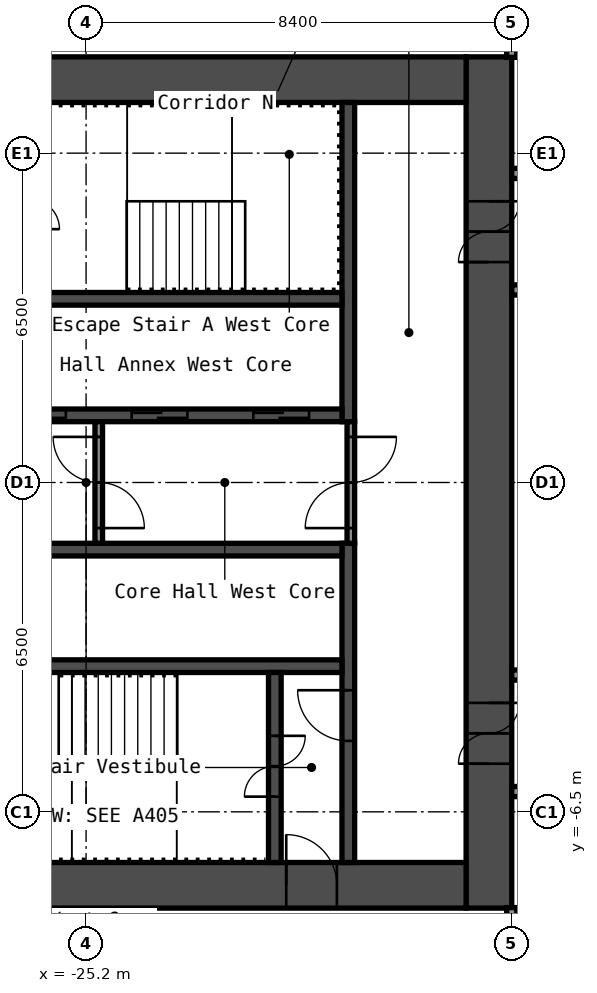
"""IFC4 building model, lengths in metres.
Left out: names, types, materials, properties, quantities, classifications, styles, units other than length and angle.
Written with IfcOpenShell. Run it as: python <this file> out.ifc"""

import sys

from ifc_helpers import new_model, si_unit, direction, frame, frame_2d, origin, place, context, subcontext, project, spatial, rectangle, extrude, element, fill, save


model = new_model("IFC4")
c1 = context("Model", 3, precision=1e-05, world=origin(), true_north=direction((0.0, 1.0)))
c2 = subcontext(c1, "Body", "Model", "MODEL_VIEW")
j1 = project(units=[si_unit("LENGTHUNIT", "METRE"), si_unit("PLANEANGLEUNIT", "RADIAN")], contexts=[c1])
p1 = place(None, origin())
s1 = spatial("IfcSite", under=j1, at=p1, CompositionType="ELEMENT")
p2 = place(p1, origin())
s2 = spatial("IfcBuilding", under=s1, at=p2, CompositionType="ELEMENT")
p3 = place(p2, frame((0.0, 0.0, 32.6)))
s3 = spatial("IfcBuildingStorey", under=s2, at=p3, CompositionType="ELEMENT", Elevation=32.6)
p4 = place(p3, frame((-17.25, -8.4, 0.0), z_axis=(0.0, 0.0, 1.0), x_axis=(0.0, 1.0, 0.0)))
e1 = element("IfcWall", 1, at=p4, inside=s3, PredefinedType="SHEAR", context=c2, shape_type="SweptSolid", body=[
    extrude(rectangle(XDim=16.8, YDim=0.9, at=frame_2d((8.4, 0.0))), origin(), (0.0, 0.0, 1.0), 2.8),
])
p5 = place(p4, frame((12.75, 0.0, 0.0)))
e2 = element("IfcOpeningElement", 2, at=p5, cuts=e1, PredefinedType="OPENING", context=c2, shape_type="SweptSolid", body=[
    extrude(rectangle(XDim=1.2, YDim=2.1, at=frame_2d((0.6, 1.05))), frame((0.0, 0.46, 0.0), z_axis=(0.0, -1.0, 0.0), x_axis=(1.0, 0.0, 0.0)), (0.0, 0.0, 1.0), 0.92),
])
p6 = place(p4, frame((2.85, 0.0, 0.0)))
e3 = element("IfcOpeningElement", 3, at=p6, cuts=e1, PredefinedType="OPENING", context=c2, shape_type="SweptSolid", body=[
    extrude(rectangle(XDim=1.2, YDim=2.1, at=frame_2d((0.6, 1.05))), frame((0.0, 0.46, 0.0), z_axis=(0.0, -1.0, 0.0), x_axis=(1.0, 0.0, 0.0)), (0.0, 0.0, 1.0), 0.92),
])
p7 = place(p3, frame((-32.7, 7.95, 0.0), z_axis=(0.0, 0.0, 1.0), x_axis=(1.0, 0.0, 0.0)))
e4 = element("IfcWall", 4, at=p7, inside=s3, PredefinedType="SHEAR", context=c2, shape_type="SweptSolid", body=[
    extrude(rectangle(XDim=15.0, YDim=0.9, at=frame_2d((7.5, 0.0))), origin(), (0.0, 0.0, 1.0), 2.8),
])
p8 = place(p7, frame((3.4, 0.0, 0.0)))
e5 = element("IfcOpeningElement", 5, at=p8, cuts=e4, PredefinedType="OPENING", context=c2, shape_type="SweptSolid", body=[
    extrude(rectangle(XDim=1.2, YDim=2.1, at=frame_2d((0.6, 1.05))), frame((0.0, 0.46, 0.0), z_axis=(0.0, -1.0, 0.0), x_axis=(1.0, 0.0, 0.0)), (0.0, 0.0, 1.0), 0.92),
])
p9 = place(p7, frame((0.75, 0.0, 0.0)))
e6 = element("IfcOpeningElement", 6, at=p9, cuts=e4, PredefinedType="OPENING", context=c2, shape_type="SweptSolid", body=[
    extrude(rectangle(XDim=0.9, YDim=2.1, at=frame_2d((0.45, 1.05))), frame((0.0, 0.46, 0.0), z_axis=(0.0, -1.0, 0.0), x_axis=(1.0, 0.0, 0.0)), (0.0, 0.0, 1.0), 0.92),
])
p10 = place(p3, frame((-32.7, -7.95, 0.0), z_axis=(0.0, 0.0, 1.0), x_axis=(1.0, 0.0, 0.0)))
e7 = element("IfcWall", 7, at=p10, inside=s3, PredefinedType="SHEAR", context=c2, shape_type="SweptSolid", body=[
    extrude(rectangle(XDim=15.0, YDim=0.9, at=frame_2d((7.5, 0.0))), origin(), (0.0, 0.0, 1.0), 2.8),
])
p11 = place(p10, frame((11.45, 0.0, 0.0)))
e8 = element("IfcOpeningElement", 8, at=p11, cuts=e7, PredefinedType="OPENING", context=c2, shape_type="SweptSolid", body=[
    extrude(rectangle(XDim=1.0, YDim=2.1, at=frame_2d((0.5, 1.05))), frame((0.0, 0.46, 0.0), z_axis=(0.0, -1.0, 0.0), x_axis=(1.0, 0.0, 0.0)), (0.0, 0.0, 1.0), 0.92),
])
p12 = place(p3, frame((-20.025, 1.2, 0.0), z_axis=(0.0, 0.0, 1.0), x_axis=(0.0, 1.0, 0.0)))
e9 = element("IfcWall", 9, at=p12, inside=s3, PredefinedType="SHEAR", context=c2, shape_type="SweptSolid", body=[
    extrude(rectangle(XDim=6.3, YDim=0.25, at=frame_2d((3.15, 0.0))), origin(), (0.0, 0.0, 1.0), 2.8),
])
p13 = place(p3, frame((-20.025, -7.5, 0.0), z_axis=(0.0, 0.0, 1.0), x_axis=(0.0, 1.0, 0.0)))
e10 = element("IfcWall", 10, at=p13, inside=s3, PredefinedType="SHEAR", context=c2, shape_type="SweptSolid", body=[
    extrude(rectangle(XDim=6.3, YDim=0.25, at=frame_2d((3.15, 0.0))), origin(), (0.0, 0.0, 1.0), 2.8),
])
p14 = place(p13, frame((2.4, 0.0, 0.0)))
e11 = element("IfcOpeningElement", 11, at=p14, cuts=e10, PredefinedType="OPENING", context=c2, shape_type="SweptSolid", body=[
    extrude(rectangle(XDim=1.0, YDim=2.1, at=frame_2d((0.5, 1.05))), frame((0.0, 0.135, 0.0), z_axis=(0.0, -1.0, 0.0), x_axis=(1.0, 0.0, 0.0)), (0.0, 0.0, 1.0), 0.27),
])
p15 = place(p3, frame((-27.65, 1.325, 0.0), z_axis=(0.0, 0.0, 1.0), x_axis=(1.0, 0.0, 0.0)))
e12 = element("IfcWall", 12, at=p15, inside=s3, PredefinedType="SHEAR", context=c2, shape_type="SweptSolid", body=[
    extrude(rectangle(XDim=7.5, YDim=0.25, at=frame_2d((3.75, 0.0))), origin(), (0.0, 0.0, 1.0), 2.8),
])
p16 = place(p15, frame((5.75, 0.0, 0.0)))
e13 = element("IfcOpeningElement", 13, at=p16, cuts=e12, PredefinedType="OPENING", context=c2, shape_type="SweptSolid", body=[
    extrude(rectangle(XDim=1.1, YDim=2.1, at=frame_2d((0.55, 1.05))), frame((0.0, 0.135, 0.0), z_axis=(0.0, -1.0, 0.0), x_axis=(1.0, 0.0, 0.0)), (0.0, 0.0, 1.0), 0.27),
])
p17 = place(p15, frame((3.35, 0.0, 0.0)))
e14 = element("IfcOpeningElement", 14, at=p17, cuts=e12, PredefinedType="OPENING", context=c2, shape_type="SweptSolid", body=[
    extrude(rectangle(XDim=1.1, YDim=2.1, at=frame_2d((0.55, 1.05))), frame((0.0, 0.135, 0.0), z_axis=(0.0, -1.0, 0.0), x_axis=(1.0, 0.0, 0.0)), (0.0, 0.0, 1.0), 0.27),
])
p18 = place(p15, frame((0.95, 0.0, 0.0)))
e15 = element("IfcOpeningElement", 15, at=p18, cuts=e12, PredefinedType="OPENING", context=c2, shape_type="SweptSolid", body=[
    extrude(rectangle(XDim=1.1, YDim=2.1, at=frame_2d((0.55, 1.05))), frame((0.0, 0.135, 0.0), z_axis=(0.0, -1.0, 0.0), x_axis=(1.0, 0.0, 0.0)), (0.0, 0.0, 1.0), 0.27),
])
for number, where, z_axis, x_axis in (
    (16, (-27.65, 3.625, 0.0), (0.0, 0.0, 1.0), (1.0, 0.0, 0.0)),
    (17, (-27.65, -1.325, 0.0), (0.0, 0.0, 1.0), (1.0, 0.0, 0.0)),
    (18, (-27.65, -3.625, 0.0), (0.0, 0.0, 1.0), (1.0, 0.0, 0.0)),
):
    element("IfcWall", number, at=place(p3, frame(where, z_axis=z_axis, x_axis=x_axis)), inside=s3, PredefinedType="SHEAR", context=c2, shape_type="SweptSolid", body=[
        extrude(rectangle(XDim=7.5, YDim=0.25, at=frame_2d((3.75, 0.0))), origin(), (0.0, 0.0, 1.0), 2.8),
    ])
p19 = place(p3, frame((-21.475, -7.5, 0.0), z_axis=(0.0, 0.0, 1.0), x_axis=(0.0, 1.0, 0.0)))
e19 = element("IfcWall", 19, at=p19, inside=s3, PredefinedType="SHEAR", context=c2, shape_type="SweptSolid", body=[
    extrude(rectangle(XDim=3.75, YDim=0.25, at=frame_2d((1.875, 0.0))), origin(), (0.0, 0.0, 1.0), 2.8),
])
p20 = place(p19, frame((1.3, 0.0, 0.0)))
e20 = element("IfcOpeningElement", 20, at=p20, cuts=e19, PredefinedType="OPENING", context=c2, shape_type="SweptSolid", body=[
    extrude(rectangle(XDim=1.2, YDim=2.1, at=frame_2d((0.6, 1.05))), frame((0.0, 0.135, 0.0), z_axis=(0.0, -1.0, 0.0), x_axis=(1.0, 0.0, 0.0)), (0.0, 0.0, 1.0), 0.27),
])
p21 = place(p3, frame((-19.975, -1.2, 0.0), z_axis=(0.0, 0.0, 1.0), x_axis=(0.0, 1.0, 0.0)))
e21 = element("IfcWall", 21, at=p21, inside=s3, PredefinedType="PARTITIONING", context=c2, shape_type="SweptSolid", body=[
    extrude(rectangle(XDim=2.4, YDim=0.15, at=frame_2d((1.2, 0.0))), origin(), (0.0, 0.0, 1.0), 2.8),
])
p22 = place(p21, frame((0.3, 0.0, 0.0)))
e22 = element("IfcOpeningElement", 22, at=p22, cuts=e21, PredefinedType="OPENING", context=c2, shape_type="SweptSolid", body=[
    extrude(rectangle(XDim=1.8, YDim=2.1, at=frame_2d((0.9, 1.05))), frame((0.0, 0.085, 0.0), z_axis=(0.0, -1.0, 0.0), x_axis=(1.0, 0.0, 0.0)), (0.0, 0.0, 1.0), 0.17),
])
p23 = place(p3, frame((-24.95, -1.2, 0.0), z_axis=(0.0, 0.0, 1.0), x_axis=(0.0, 1.0, 0.0)))
e23 = element("IfcWall", 23, at=p23, inside=s3, PredefinedType="PARTITIONING", context=c2, shape_type="SweptSolid", body=[
    extrude(rectangle(XDim=2.4, YDim=0.15, at=frame_2d((1.2, 0.0))), origin(), (0.0, 0.0, 1.0), 2.8),
])
p24 = place(p23, frame((0.3, 0.0, 0.0)))
e24 = element("IfcOpeningElement", 24, at=p24, cuts=e23, PredefinedType="OPENING", context=c2, shape_type="SweptSolid", body=[
    extrude(rectangle(XDim=1.8, YDim=2.1, at=frame_2d((0.9, 1.05))), frame((0.0, 0.085, 0.0), z_axis=(0.0, -1.0, 0.0), x_axis=(1.0, 0.0, 0.0)), (0.0, 0.0, 1.0), 0.17),
])
p25 = place(p3, frame((-16.8, -6.1, 0.0), z_axis=(0.0, 0.0, 1.0), x_axis=(1.0, 0.0, 0.0)))
e25 = element("IfcWall", 25, at=p25, inside=s3, PredefinedType="PARTITIONING", context=c2, shape_type="SweptSolid", body=[
    extrude(rectangle(XDim=33.6, YDim=0.2, at=frame_2d((16.8, 0.0))), origin(), (0.0, 0.0, 1.0), 2.8),
])
p26 = place(p25, frame((1.6, 0.0, 0.0)))
e26 = element("IfcOpeningElement", 26, at=p26, cuts=e25, PredefinedType="OPENING", context=c2, shape_type="SweptSolid", body=[
    extrude(rectangle(XDim=1.0, YDim=2.1, at=frame_2d((0.5, 1.05))), frame((0.0, 0.11, 0.0), z_axis=(0.0, -1.0, 0.0), x_axis=(1.0, 0.0, 0.0)), (0.0, 0.0, 1.0), 0.22),
])
p27 = place(p25, frame((10.0, 0.0, 0.0)))
e27 = element("IfcOpeningElement", 27, at=p27, cuts=e25, PredefinedType="OPENING", context=c2, shape_type="SweptSolid", body=[
    extrude(rectangle(XDim=1.0, YDim=2.1, at=frame_2d((0.5, 1.05))), frame((0.0, 0.11, 0.0), z_axis=(0.0, -1.0, 0.0), x_axis=(1.0, 0.0, 0.0)), (0.0, 0.0, 1.0), 0.22),
])
p28 = place(p25, frame((22.6, 0.0, 0.0)))
e28 = element("IfcOpeningElement", 28, at=p28, cuts=e25, PredefinedType="OPENING", context=c2, shape_type="SweptSolid", body=[
    extrude(rectangle(XDim=1.0, YDim=2.1, at=frame_2d((0.5, 1.05))), frame((0.0, 0.11, 0.0), z_axis=(0.0, -1.0, 0.0), x_axis=(1.0, 0.0, 0.0)), (0.0, 0.0, 1.0), 0.22),
])
p29 = place(p25, frame((27.1, 0.0, 0.0)))
e29 = element("IfcOpeningElement", 29, at=p29, cuts=e25, PredefinedType="OPENING", context=c2, shape_type="SweptSolid", body=[
    extrude(rectangle(XDim=1.0, YDim=2.1, at=frame_2d((0.5, 1.05))), frame((0.0, 0.11, 0.0), z_axis=(0.0, -1.0, 0.0), x_axis=(1.0, 0.0, 0.0)), (0.0, 0.0, 1.0), 0.22),
])
p30 = place(p3, frame((-16.8, -3.8, 0.0), z_axis=(0.0, 0.0, 1.0), x_axis=(1.0, 0.0, 0.0)))
e30 = element("IfcWall", 30, at=p30, inside=s3, PredefinedType="PARTITIONING", context=c2, shape_type="SweptSolid", body=[
    extrude(rectangle(XDim=33.6, YDim=0.2, at=frame_2d((16.8, 0.0))), origin(), (0.0, 0.0, 1.0), 2.8),
])
p31 = place(p30, frame((10.3, 0.0, 0.0)))
e31 = element("IfcOpeningElement", 31, at=p31, cuts=e30, PredefinedType="OPENING", context=c2, shape_type="SweptSolid", body=[
    extrude(rectangle(XDim=0.9, YDim=2.1, at=frame_2d((0.45, 1.05))), frame((0.0, 0.11, 0.0), z_axis=(0.0, -1.0, 0.0), x_axis=(1.0, 0.0, 0.0)), (0.0, 0.0, 1.0), 0.22),
])
p32 = place(p30, frame((14.5, 0.0, 0.0)))
e32 = element("IfcOpeningElement", 32, at=p32, cuts=e30, PredefinedType="OPENING", context=c2, shape_type="SweptSolid", body=[
    extrude(rectangle(XDim=0.9, YDim=2.1, at=frame_2d((0.45, 1.05))), frame((0.0, 0.11, 0.0), z_axis=(0.0, -1.0, 0.0), x_axis=(1.0, 0.0, 0.0)), (0.0, 0.0, 1.0), 0.22),
])
p33 = place(p30, frame((27.02, 0.0, 0.0)))
e33 = element("IfcOpeningElement", 33, at=p33, cuts=e30, PredefinedType="OPENING", context=c2, shape_type="SweptSolid", body=[
    extrude(rectangle(XDim=0.9, YDim=2.1, at=frame_2d((0.45, 1.05))), frame((0.0, 0.11, 0.0), z_axis=(0.0, -1.0, 0.0), x_axis=(1.0, 0.0, 0.0)), (0.0, 0.0, 1.0), 0.22),
])
p34 = place(p30, frame((31.22, 0.0, 0.0)))
e34 = element("IfcOpeningElement", 34, at=p34, cuts=e30, PredefinedType="OPENING", context=c2, shape_type="SweptSolid", body=[
    extrude(rectangle(XDim=0.9, YDim=2.1, at=frame_2d((0.45, 1.05))), frame((0.0, 0.11, 0.0), z_axis=(0.0, -1.0, 0.0), x_axis=(1.0, 0.0, 0.0)), (0.0, 0.0, 1.0), 0.22),
])
p35 = place(p3, frame((-16.8, 3.8, 0.0), z_axis=(0.0, 0.0, 1.0), x_axis=(1.0, 0.0, 0.0)))
e35 = element("IfcWall", 35, at=p35, inside=s3, PredefinedType="PARTITIONING", context=c2, shape_type="SweptSolid", body=[
    extrude(rectangle(XDim=33.6, YDim=0.2, at=frame_2d((16.8, 0.0))), origin(), (0.0, 0.0, 1.0), 2.8),
])
p36 = place(p35, frame((1.4, 0.0, 0.0)))
e36 = element("IfcOpeningElement", 36, at=p36, cuts=e35, PredefinedType="OPENING", context=c2, shape_type="SweptSolid", body=[
    extrude(rectangle(XDim=0.9, YDim=2.1, at=frame_2d((0.45, 1.05))), frame((0.0, 0.11, 0.0), z_axis=(0.0, -1.0, 0.0), x_axis=(1.0, 0.0, 0.0)), (0.0, 0.0, 1.0), 0.22),
])
p37 = place(p35, frame((5.6, 0.0, 0.0)))
e37 = element("IfcOpeningElement", 37, at=p37, cuts=e35, PredefinedType="OPENING", context=c2, shape_type="SweptSolid", body=[
    extrude(rectangle(XDim=0.9, YDim=2.1, at=frame_2d((0.45, 1.05))), frame((0.0, 0.11, 0.0), z_axis=(0.0, -1.0, 0.0), x_axis=(1.0, 0.0, 0.0)), (0.0, 0.0, 1.0), 0.22),
])
p38 = place(p35, frame((18.87, 0.0, 0.0)))
e38 = element("IfcOpeningElement", 38, at=p38, cuts=e35, PredefinedType="OPENING", context=c2, shape_type="SweptSolid", body=[
    extrude(rectangle(XDim=0.9, YDim=2.1, at=frame_2d((0.45, 1.05))), frame((0.0, 0.11, 0.0), z_axis=(0.0, -1.0, 0.0), x_axis=(1.0, 0.0, 0.0)), (0.0, 0.0, 1.0), 0.22),
])
p39 = place(p35, frame((23.07, 0.0, 0.0)))
e39 = element("IfcOpeningElement", 39, at=p39, cuts=e35, PredefinedType="OPENING", context=c2, shape_type="SweptSolid", body=[
    extrude(rectangle(XDim=0.9, YDim=2.1, at=frame_2d((0.45, 1.05))), frame((0.0, 0.11, 0.0), z_axis=(0.0, -1.0, 0.0), x_axis=(1.0, 0.0, 0.0)), (0.0, 0.0, 1.0), 0.22),
])
p40 = place(p3, frame((-16.8, 6.1, 0.0), z_axis=(0.0, 0.0, 1.0), x_axis=(1.0, 0.0, 0.0)))
e40 = element("IfcWall", 40, at=p40, inside=s3, PredefinedType="PARTITIONING", context=c2, shape_type="SweptSolid", body=[
    extrude(rectangle(XDim=33.6, YDim=0.2, at=frame_2d((16.8, 0.0))), origin(), (0.0, 0.0, 1.0), 2.8),
])
p41 = place(p40, frame((1.9, 0.0, 0.0)))
e41 = element("IfcOpeningElement", 41, at=p41, cuts=e40, PredefinedType="OPENING", context=c2, shape_type="SweptSolid", body=[
    extrude(rectangle(XDim=1.0, YDim=2.1, at=frame_2d((0.5, 1.05))), frame((0.0, 0.11, 0.0), z_axis=(0.0, -1.0, 0.0), x_axis=(1.0, 0.0, 0.0)), (0.0, 0.0, 1.0), 0.22),
])
p42 = place(p40, frame((14.2, 0.0, 0.0)))
e42 = element("IfcOpeningElement", 42, at=p42, cuts=e40, PredefinedType="OPENING", context=c2, shape_type="SweptSolid", body=[
    extrude(rectangle(XDim=1.0, YDim=2.1, at=frame_2d((0.5, 1.05))), frame((0.0, 0.11, 0.0), z_axis=(0.0, -1.0, 0.0), x_axis=(1.0, 0.0, 0.0)), (0.0, 0.0, 1.0), 0.22),
])
p43 = place(p40, frame((18.4, 0.0, 0.0)))
e43 = element("IfcOpeningElement", 43, at=p43, cuts=e40, PredefinedType="OPENING", context=c2, shape_type="SweptSolid", body=[
    extrude(rectangle(XDim=1.0, YDim=2.1, at=frame_2d((0.5, 1.05))), frame((0.0, 0.11, 0.0), z_axis=(0.0, -1.0, 0.0), x_axis=(1.0, 0.0, 0.0)), (0.0, 0.0, 1.0), 0.22),
])
p44 = place(p40, frame((31.0, 0.0, 0.0)))
e44 = element("IfcOpeningElement", 44, at=p44, cuts=e40, PredefinedType="OPENING", context=c2, shape_type="SweptSolid", body=[
    extrude(rectangle(XDim=1.0, YDim=2.1, at=frame_2d((0.5, 1.05))), frame((0.0, 0.11, 0.0), z_axis=(0.0, -1.0, 0.0), x_axis=(1.0, 0.0, 0.0)), (0.0, 0.0, 1.0), 0.22),
])
for number, where, z_axis, x_axis in (
    (45, (-16.8, -20.3, 0.0), (0.0, 0.0, 1.0), (0.0, 1.0, 0.0)),
    (46, (-16.8, 8.39, 0.0), (0.0, 0.0, 1.0), (0.0, 1.0, 0.0)),
):
    element("IfcWall", number, at=place(p3, frame(where, z_axis=z_axis, x_axis=x_axis)), inside=s3, PredefinedType="PARTITIONING", context=c2, shape_type="SweptSolid", body=[
        extrude(rectangle(XDim=11.91, YDim=0.2, at=frame_2d((5.955, 0.0))), origin(), (0.0, 0.0, 1.0), 2.8),
    ])
p45 = place(p5, origin())
e47 = element("IfcDoor", 47, at=p45, inside=s3, OperationType="DOUBLE_DOOR_SINGLE_SWING", PredefinedType="DOOR", context=c2, shape_type="SweptSolid", body=[
    extrude(rectangle(XDim=1.2, YDim=2.1, at=frame_2d((0.6, 1.05))), frame((0.0, 0.025, 0.0), z_axis=(0.0, -1.0, 0.0), x_axis=(1.0, 0.0, 0.0)), (0.0, 0.0, 1.0), 0.05),
])
fill(e2, e47)
p46 = place(p6, origin())
e48 = element("IfcDoor", 48, at=p46, inside=s3, OperationType="DOUBLE_DOOR_SINGLE_SWING", PredefinedType="DOOR", context=c2, shape_type="SweptSolid", body=[
    extrude(rectangle(XDim=1.2, YDim=2.1, at=frame_2d((0.6, 1.05))), frame((0.0, 0.025, 0.0), z_axis=(0.0, -1.0, 0.0), x_axis=(1.0, 0.0, 0.0)), (0.0, 0.0, 1.0), 0.05),
])
fill(e3, e48)
p47 = place(p11, origin())
e49 = element("IfcDoor", 49, at=p47, inside=s3, OperationType="SINGLE_SWING_RIGHT", PredefinedType="DOOR", context=c2, shape_type="SweptSolid", body=[
    extrude(rectangle(XDim=1.0, YDim=2.1, at=frame_2d((0.5, 1.05))), frame((0.0, 0.025, 0.0), z_axis=(0.0, -1.0, 0.0), x_axis=(1.0, 0.0, 0.0)), (0.0, 0.0, 1.0), 0.05),
])
fill(e8, e49)
p48 = place(p20, origin())
e50 = element("IfcDoor", 50, at=p48, inside=s3, OperationType="DOUBLE_DOOR_SINGLE_SWING", PredefinedType="DOOR", context=c2, shape_type="SweptSolid", body=[
    extrude(rectangle(XDim=1.2, YDim=2.1, at=frame_2d((0.6, 1.05))), frame((0.0, 0.025, 0.0), z_axis=(0.0, -1.0, 0.0), x_axis=(1.0, 0.0, 0.0)), (0.0, 0.0, 1.0), 0.05),
])
fill(e20, e50)
p49 = place(p14, origin())
e51 = element("IfcDoor", 51, at=p49, inside=s3, OperationType="SINGLE_SWING_LEFT", PredefinedType="DOOR", context=c2, shape_type="SweptSolid", body=[
    extrude(rectangle(XDim=1.0, YDim=2.1, at=frame_2d((0.5, 1.05))), frame((0.0, 0.025, 0.0), z_axis=(0.0, -1.0, 0.0), x_axis=(1.0, 0.0, 0.0)), (0.0, 0.0, 1.0), 0.05),
])
fill(e11, e51)
p50 = place(p22, origin())
e52 = element("IfcDoor", 52, at=p50, inside=s3, OperationType="DOUBLE_DOOR_SINGLE_SWING", PredefinedType="DOOR", context=c2, shape_type="SweptSolid", body=[
    extrude(rectangle(XDim=1.8, YDim=2.1, at=frame_2d((0.9, 1.05))), frame((0.0, 0.025, 0.0), z_axis=(0.0, -1.0, 0.0), x_axis=(1.0, 0.0, 0.0)), (0.0, 0.0, 1.0), 0.05),
])
fill(e22, e52)
p51 = place(p24, origin())
e53 = element("IfcDoor", 53, at=p51, inside=s3, OperationType="DOUBLE_DOOR_SINGLE_SWING", PredefinedType="DOOR", context=c2, shape_type="SweptSolid", body=[
    extrude(rectangle(XDim=1.8, YDim=2.1, at=frame_2d((0.9, 1.05))), frame((0.0, 0.025, 0.0), z_axis=(0.0, -1.0, 0.0), x_axis=(1.0, 0.0, 0.0)), (0.0, 0.0, 1.0), 0.05),
])
fill(e24, e53)
p52 = place(p16, origin())
e54 = element("IfcDoor", 54, at=p52, inside=s3, OperationType="DOUBLE_DOOR_SLIDING", PredefinedType="DOOR", context=c2, shape_type="SweptSolid", body=[
    extrude(rectangle(XDim=1.1, YDim=2.1, at=frame_2d((0.55, 1.05))), frame((0.0, 0.025, 0.0), z_axis=(0.0, -1.0, 0.0), x_axis=(1.0, 0.0, 0.0)), (0.0, 0.0, 1.0), 0.05),
])
fill(e13, e54)
p53 = place(p17, origin())
e55 = element("IfcDoor", 55, at=p53, inside=s3, OperationType="DOUBLE_DOOR_SLIDING", PredefinedType="DOOR", context=c2, shape_type="SweptSolid", body=[
    extrude(rectangle(XDim=1.1, YDim=2.1, at=frame_2d((0.55, 1.05))), frame((0.0, 0.025, 0.0), z_axis=(0.0, -1.0, 0.0), x_axis=(1.0, 0.0, 0.0)), (0.0, 0.0, 1.0), 0.05),
])
fill(e14, e55)
p54 = place(p18, origin())
e56 = element("IfcDoor", 56, at=p54, inside=s3, OperationType="DOUBLE_DOOR_SLIDING", PredefinedType="DOOR", context=c2, shape_type="SweptSolid", body=[
    extrude(rectangle(XDim=1.1, YDim=2.1, at=frame_2d((0.55, 1.05))), frame((0.0, 0.025, 0.0), z_axis=(0.0, -1.0, 0.0), x_axis=(1.0, 0.0, 0.0)), (0.0, 0.0, 1.0), 0.05),
])
fill(e15, e56)
save(model, sys.argv[1])
